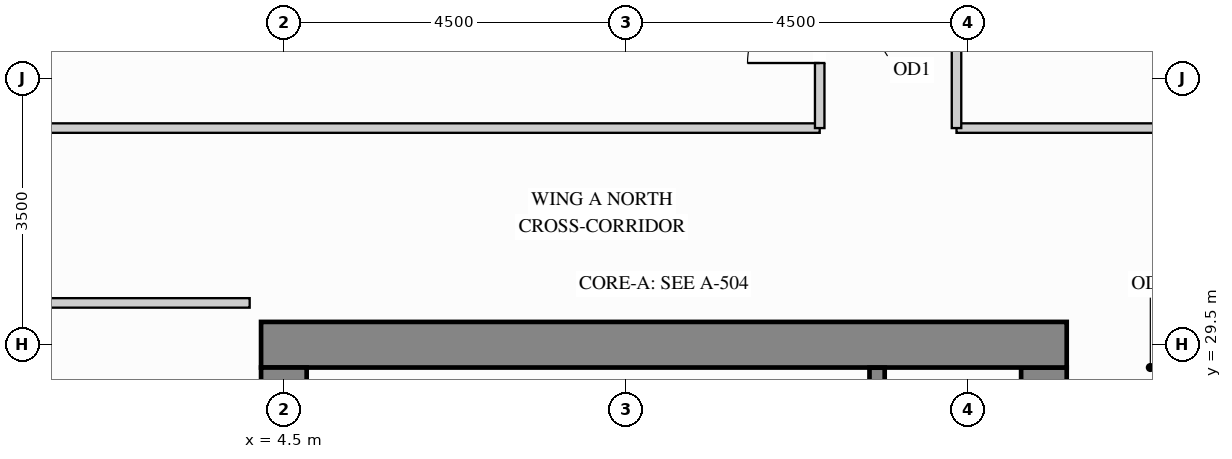
"""IFC4 building model, lengths in metres.
Left out: names, types, materials, properties, quantities, classifications, styles, units other than length and angle.
Written with IfcOpenShell. Run it as: python <this file> out.ifc"""

import sys

from ifc_helpers import new_model, si_unit, direction, frame, frame_2d, origin, place, context, subcontext, project, spatial, rectangle, extrude, source, transform, mapped, element, fill, save


model = new_model("IFC4")
c1 = context("Model", 3, precision=1e-05, world=origin(), true_north=direction((0.0, 1.0)))
c2 = subcontext(c1, "Body", "Model", "MODEL_VIEW")
j1 = project(units=[si_unit("LENGTHUNIT", "METRE"), si_unit("PLANEANGLEUNIT", "RADIAN")], contexts=[c1])
p1 = place(None, origin())
s1 = spatial("IfcSite", under=j1, at=p1, CompositionType="ELEMENT")
p2 = place(p1, origin())
s2 = spatial("IfcBuilding", under=s1, at=p2, CompositionType="ELEMENT")
p3 = place(p2, frame((0.0, 0.0, 186.3)))
s3 = spatial("IfcBuildingStorey", under=s2, at=p3, CompositionType="ELEMENT", Elevation=186.3)
m1 = source(origin(), c2, "Body", "SweptSolid", [
    extrude(rectangle(XDim=8.32, YDim=0.6, at=frame_2d((4.16, 0.0))), origin(), (0.0, 0.0, 1.0), 3.4),
])
p4 = place(p3, frame((14.5, 20.88, 0.0), z_axis=(0.0, 0.0, 1.0), x_axis=(0.0, 1.0, 0.0)))
e1 = element("IfcWall", 1, at=p4, inside=s3, PredefinedType="SHEAR", context=c2, shape_type="MappedRepresentation", body=[
    mapped(m1, transform((0.0, 0.0, 0.0), x_axis=(1.0, 0.0, 0.0), y_axis=(0.0, 1.0, 0.0), z_axis=(0.0, 0.0, 1.0))),
])
m2 = source(origin(), c2, "Body", "SweptSolid", [
    extrude(rectangle(XDim=10.6, YDim=0.6, at=frame_2d((5.3, 0.0))), origin(), (0.0, 0.0, 1.0), 3.4),
])
p5 = place(p3, frame((4.2, 29.5, 0.0), z_axis=(0.0, 0.0, 1.0), x_axis=(1.0, 0.0, 0.0)))
e2 = element("IfcWall", 2, at=p5, inside=s3, PredefinedType="SHEAR", context=c2, shape_type="MappedRepresentation", body=[
    mapped(m2, transform((0.0, 0.0, 0.0), x_axis=(1.0, 0.0, 0.0), y_axis=(0.0, 1.0, 0.0), z_axis=(0.0, 0.0, 1.0))),
])
m3 = source(origin(), c2, "Body", "SweptSolid", [
    extrude(rectangle(XDim=20.4, YDim=0.6, at=frame_2d((10.2, 0.0))), origin(), (0.0, 0.0, 1.0), 3.4),
])
p6 = place(p3, frame((4.5, 8.8, 0.0), z_axis=(0.0, 0.0, 1.0), x_axis=(0.0, 1.0, 0.0)))
e3 = element("IfcWall", 3, at=p6, inside=s3, PredefinedType="SHEAR", context=c2, shape_type="MappedRepresentation", body=[
    mapped(m3, transform((0.0, 0.0, 0.0), x_axis=(1.0, 0.0, 0.0), y_axis=(0.0, 1.0, 0.0), z_axis=(0.0, 0.0, 1.0))),
])
m4 = source(origin(), c2, "Body", "SweptSolid", [
    extrude(rectangle(XDim=5.798, YDim=0.125, at=frame_2d((2.899, 0.0))), origin(), (0.0, 0.0, 1.0), 3.385),
])
p7 = place(p3, frame((13.35, 32.35, 0.0), z_axis=(0.0, 0.0, 1.0), x_axis=(1.0, 0.0, 0.0)))
e4 = element("IfcWall", 4, at=p7, inside=s3, PredefinedType="PARTITIONING", context=c2, shape_type="MappedRepresentation", body=[
    mapped(m4, transform((0.0, 0.0, 0.0), x_axis=(1.0, 0.0, 0.0), y_axis=(0.0, 1.0, 0.0), z_axis=(0.0, 0.0, 1.0))),
])
m5 = source(origin(), c2, "Body", "SweptSolid", [
    extrude(rectangle(XDim=11.198, YDim=0.125, at=frame_2d((5.599, 0.0))), origin(), (0.0, 0.0, 1.0), 3.385),
])
p8 = place(p3, frame((0.352, 32.35, 0.0), z_axis=(0.0, 0.0, 1.0), x_axis=(1.0, 0.0, 0.0)))
e5 = element("IfcWall", 5, at=p8, inside=s3, PredefinedType="PARTITIONING", context=c2, shape_type="MappedRepresentation", body=[
    mapped(m5, transform((0.0, 0.0, 0.0), x_axis=(1.0, 0.0, 0.0), y_axis=(0.0, 1.0, 0.0), z_axis=(0.0, 0.0, 1.0))),
])
m6 = source(origin(), c2, "Body", "SweptSolid", [
    extrude(rectangle(XDim=2.93, YDim=0.125, at=frame_2d((1.465, 0.0))), origin(), (0.0, 0.0, 1.0), 3.385),
])
p9 = place(p3, frame((1.12, 30.05, 0.0), z_axis=(0.0, 0.0, 1.0), x_axis=(1.0, 0.0, 0.0)))
e6 = element("IfcWall", 6, at=p9, inside=s3, PredefinedType="PARTITIONING", context=c2, shape_type="MappedRepresentation", body=[
    mapped(m6, transform((0.0, 0.0, 0.0), x_axis=(1.0, 0.0, 0.0), y_axis=(0.0, 1.0, 0.0), z_axis=(0.0, 0.0, 1.0))),
])
p10 = place(p3, frame((13.35, 32.35, 0.0), z_axis=(0.0, 0.0, 1.0), x_axis=(0.0, 1.0, 0.0)))
e7 = element("IfcWall", 7, at=p10, inside=s3, PredefinedType="PARTITIONING", context=c2, shape_type="SweptSolid", body=[
    extrude(rectangle(XDim=3.388, YDim=0.125, at=frame_2d((1.694, 0.0))), origin(), (0.0, 0.0, 1.0), 3.385),
])
p11 = place(p10, frame((1.219, 0.0, 0.0)))
e8 = element("IfcOpeningElement", 8, at=p11, cuts=e7, PredefinedType="OPENING", context=c2, shape_type="SweptSolid", body=[
    extrude(rectangle(XDim=0.95, YDim=2.15, at=frame_2d((0.475, 1.075))), frame((0.0, 0.073, 0.0), z_axis=(0.0, -1.0, 0.0), x_axis=(1.0, 0.0, 0.0)), (0.0, 0.0, 1.0), 0.145),
])
p12 = place(p3, frame((11.55, 32.35, 0.0), z_axis=(0.0, 0.0, 1.0), x_axis=(0.0, 1.0, 0.0)))
e9 = element("IfcWall", 9, at=p12, inside=s3, PredefinedType="PARTITIONING", context=c2, shape_type="SweptSolid", body=[
    extrude(rectangle(XDim=2.662, YDim=0.125, at=frame_2d((1.331, 0.0))), origin(), (0.0, 0.0, 1.0), 3.385),
])
p13 = place(p12, frame((0.856, 0.0, 0.0)))
e10 = element("IfcOpeningElement", 10, at=p13, cuts=e9, PredefinedType="OPENING", context=c2, shape_type="SweptSolid", body=[
    extrude(rectangle(XDim=0.95, YDim=2.15, at=frame_2d((0.475, 1.075))), frame((0.0, 0.073, 0.0), z_axis=(0.0, -1.0, 0.0), x_axis=(1.0, 0.0, 0.0)), (0.0, 0.0, 1.0), 0.145),
])
m7 = source(origin(), c2, "Body", "SweptSolid", [
    extrude(rectangle(XDim=3.753, YDim=0.2, at=frame_2d((1.876, 0.0))), origin(), (0.0, 0.0, 1.0), 3.4),
])
p14 = place(p3, frame((12.305, 25.445, 0.0), z_axis=(0.0, 0.0, 1.0), x_axis=(0.0, 1.0, 0.0)))
e11 = element("IfcWall", 11, at=p14, inside=s3, PredefinedType="SHEAR", context=c2, shape_type="MappedRepresentation", body=[
    mapped(m7, transform((0.0, 0.0, 0.0), x_axis=(1.0, 0.0, 0.0), y_axis=(0.0, 1.0, 0.0), z_axis=(0.0, 0.0, 1.0))),
])
m8 = source(origin(), c2, "Body", "SweptSolid", [
    extrude(rectangle(XDim=0.95, YDim=2.15, at=frame_2d((0.475, 1.075))), frame((0.0, 0.025, 0.0), z_axis=(0.0, -1.0, 0.0), x_axis=(1.0, 0.0, 0.0)), (0.0, 0.0, 1.0), 0.05),
])
p15 = place(p13, origin())
e12 = element("IfcDoor", 12, at=p15, inside=s3, OperationType="SINGLE_SWING_LEFT", PredefinedType="DOOR", context=c2, shape_type="MappedRepresentation", body=[
    mapped(m8, transform((0.0, 0.0, 0.0), x_axis=(1.0, 0.0, 0.0), y_axis=(0.0, 1.0, 0.0), z_axis=(0.0, 0.0, 1.0))),
])
fill(e10, e12)
save(model, sys.argv[1])
